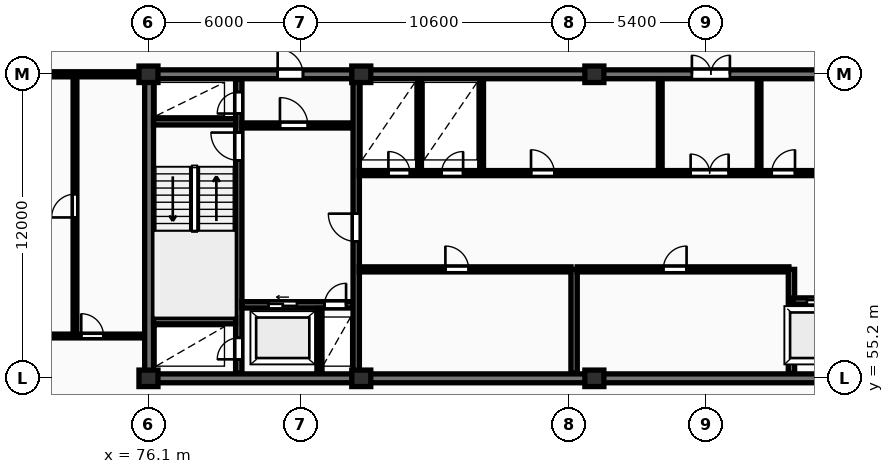
"""IFC4 building model, lengths in metres.
Left out: names, types, materials, properties, quantities, classifications, styles, units other than length and angle.
Written with IfcOpenShell. Run it as: python <this file> out.ifc"""

import sys

from ifc_helpers import new_model, si_unit, direction, frame, frame_2d, origin, origin_2d, place, context, subcontext, project, spatial, rectangle, extrude, element, fill, save


model = new_model("IFC4")
c1 = context("Model", 3, precision=1e-05, world=origin(), true_north=direction((0.0, 1.0)))
c2 = subcontext(c1, "Body", "Model", "MODEL_VIEW")
j1 = project(units=[si_unit("LENGTHUNIT", "METRE"), si_unit("PLANEANGLEUNIT", "RADIAN")], contexts=[c1])
p1 = place(None, origin())
s1 = spatial("IfcSite", under=j1, at=p1, CompositionType="ELEMENT")
p2 = place(p1, origin())
s2 = spatial("IfcBuilding", under=s1, at=p2, CompositionType="ELEMENT")
p3 = place(p2, frame((0.0, 0.0, 228.65)))
s3 = spatial("IfcBuildingStorey", under=s2, at=p3, CompositionType="ELEMENT", Elevation=228.65)
for number, where, z_axis, x_axis in (
    (1, (76.1, 55.2, 0.0), (0.0, 0.0, 1.0), (1.0, 0.0, 0.0)),
    (2, (76.1, 67.2, 0.0), (0.0, 0.0, 1.0), (1.0, 0.0, 0.0)),
    (3, (84.5, 55.2, 0.0), (0.0, 0.0, 1.0), (1.0, 0.0, 0.0)),
    (4, (84.5, 67.2, 0.0), (0.0, 0.0, 1.0), (1.0, 0.0, 0.0)),
    (5, (93.7, 55.2, 0.0), (0.0, 0.0, 1.0), (1.0, 0.0, 0.0)),
    (6, (93.7, 67.2, 0.0), (0.0, 0.0, 1.0), (1.0, 0.0, 0.0)),
):
    element("IfcColumn", number, at=place(p3, frame(where, z_axis=z_axis, x_axis=x_axis)), inside=s3, PredefinedType="COLUMN", context=c2, shape_type="SweptSolid", body=[
        extrude(rectangle(XDim=0.75, YDim=0.65, at=origin_2d()), origin(), (0.0, 0.0, 1.0), 3.45),
    ])
p4 = place(p3, frame((75.95, 55.2, 0.0), z_axis=(0.0, 0.0, 1.0), x_axis=(1.0, 0.0, 0.0)))
e7 = element("IfcWall", 7, at=p4, inside=s3, PredefinedType="SHEAR", context=c2, shape_type="SweptSolid", body=[
    extrude(rectangle(XDim=36.3, YDim=0.35, at=frame_2d((18.15, 0.0))), origin(), (0.0, 0.0, 1.0), 3.45),
])
p5 = place(p3, frame((76.125, 55.375, 0.0), z_axis=(0.0, 0.0, 1.0), x_axis=(0.0, 1.0, 0.0)))
e8 = element("IfcWall", 8, at=p5, inside=s3, PredefinedType="SHEAR", context=c2, shape_type="SweptSolid", body=[
    extrude(rectangle(XDim=11.65, YDim=0.35, at=frame_2d((5.825, 0.0))), origin(), (0.0, 0.0, 1.0), 3.45),
])
p6 = place(p3, frame((75.95, 67.2, 0.0), z_axis=(0.0, 0.0, 1.0), x_axis=(1.0, 0.0, 0.0)))
e9 = element("IfcWall", 9, at=p6, inside=s3, PredefinedType="SHEAR", context=c2, shape_type="SweptSolid", body=[
    extrude(rectangle(XDim=36.3, YDim=0.35, at=frame_2d((18.15, 0.0))), origin(), (0.0, 0.0, 1.0), 3.45),
])
p7 = place(p6, frame((5.25, 0.0, 0.0)))
e10 = element("IfcOpeningElement", 10, at=p7, cuts=e9, PredefinedType="OPENING", context=c2, shape_type="SweptSolid", body=[
    extrude(rectangle(XDim=1.0, YDim=2.15, at=frame_2d((0.5, 1.075))), frame((0.0, 0.185, 0.0), z_axis=(0.0, -1.0, 0.0), x_axis=(1.0, 0.0, 0.0)), (0.0, 0.0, 1.0), 0.37),
])
p8 = place(p6, frame((21.6, 0.0, 0.0)))
e11 = element("IfcOpeningElement", 11, at=p8, cuts=e9, PredefinedType="OPENING", context=c2, shape_type="SweptSolid", body=[
    extrude(rectangle(XDim=1.5, YDim=2.2, at=frame_2d((0.75, 1.1))), frame((0.0, 0.185, 0.0), z_axis=(0.0, -1.0, 0.0), x_axis=(1.0, 0.0, 0.0)), (0.0, 0.0, 1.0), 0.37),
])
p9 = place(p6, frame((30.45, 0.0, 0.0)))
e12 = element("IfcOpeningElement", 12, at=p9, cuts=e9, PredefinedType="OPENING", context=c2, shape_type="SweptSolid", body=[
    extrude(rectangle(XDim=1.0, YDim=2.15, at=frame_2d((0.5, 1.075))), frame((0.0, 0.185, 0.0), z_axis=(0.0, -1.0, 0.0), x_axis=(1.0, 0.0, 0.0)), (0.0, 0.0, 1.0), 0.37),
])
p10 = place(p3, frame((79.665, 55.4, 0.0), z_axis=(0.0, 0.0, 1.0), x_axis=(0.0, 1.0, 0.0)))
e13 = element("IfcWall", 13, at=p10, inside=s3, PredefinedType="SHEAR", context=c2, shape_type="SweptSolid", body=[
    extrude(rectangle(XDim=11.6, YDim=0.25, at=frame_2d((5.8, 0.0))), origin(), (0.0, 0.0, 1.0), 3.45),
])
p11 = place(p10, frame((0.55, 0.0, 0.0)))
e14 = element("IfcOpeningElement", 14, at=p11, cuts=e13, PredefinedType="OPENING", context=c2, shape_type="SweptSolid", body=[
    extrude(rectangle(XDim=0.85, YDim=2.05, at=frame_2d((0.425, 1.025))), frame((0.0, 0.135, 0.0), z_axis=(0.0, -1.0, 0.0), x_axis=(1.0, 0.0, 0.0)), (0.0, 0.0, 1.0), 0.27),
])
p12 = place(p10, frame((8.4, 0.0, 0.0)))
e15 = element("IfcOpeningElement", 15, at=p12, cuts=e13, PredefinedType="OPENING", context=c2, shape_type="SweptSolid", body=[
    extrude(rectangle(XDim=1.1, YDim=2.1, at=frame_2d((0.55, 1.05))), frame((0.0, 0.135, 0.0), z_axis=(0.0, -1.0, 0.0), x_axis=(1.0, 0.0, 0.0)), (0.0, 0.0, 1.0), 0.27),
])
p13 = place(p10, frame((10.25, 0.0, 0.0)))
e16 = element("IfcOpeningElement", 16, at=p13, cuts=e13, PredefinedType="OPENING", context=c2, shape_type="SweptSolid", body=[
    extrude(rectangle(XDim=0.85, YDim=2.05, at=frame_2d((0.425, 1.025))), frame((0.0, 0.135, 0.0), z_axis=(0.0, -1.0, 0.0), x_axis=(1.0, 0.0, 0.0)), (0.0, 0.0, 1.0), 0.27),
])
for number, where, z_axis, x_axis in (
    (17, (76.3, 57.475, 0.0), (0.0, 0.0, 1.0), (1.0, 0.0, 0.0)),
    (18, (76.3, 65.325, 0.0), (0.0, 0.0, 1.0), (1.0, 0.0, 0.0)),
):
    element("IfcWall", number, at=place(p3, frame(where, z_axis=z_axis, x_axis=x_axis)), inside=s3, PredefinedType="SHEAR", context=c2, shape_type="SweptSolid", body=[
        extrude(rectangle(XDim=3.24, YDim=0.25, at=frame_2d((1.62, 0.0))), origin(), (0.0, 0.0, 1.0), 3.45),
    ])
p14 = place(p3, frame((79.79, 58.1, 0.0), z_axis=(0.0, 0.0, 1.0), x_axis=(1.0, 0.0, 0.0)))
e19 = element("IfcWall", 19, at=p14, inside=s3, PredefinedType="SHEAR", context=c2, shape_type="SweptSolid", body=[
    extrude(rectangle(XDim=4.39, YDim=0.25, at=frame_2d((2.195, 0.0))), origin(), (0.0, 0.0, 1.0), 3.45),
])
p15 = place(p14, frame((1.05, 0.0, 0.0)))
e20 = element("IfcOpeningElement", 20, at=p15, cuts=e19, PredefinedType="OPENING", context=c2, shape_type="SweptSolid", body=[
    extrude(rectangle(XDim=1.12, YDim=2.12, at=frame_2d((0.56, 1.06))), frame((0.0, 0.135, 0.0), z_axis=(0.0, -1.0, 0.0), x_axis=(1.0, 0.0, 0.0)), (0.0, 0.0, 1.0), 0.27),
])
p16 = place(p14, frame((3.26, 0.0, 0.0)))
e21 = element("IfcOpeningElement", 21, at=p16, cuts=e19, PredefinedType="OPENING", context=c2, shape_type="SweptSolid", body=[
    extrude(rectangle(XDim=0.85, YDim=2.05, at=frame_2d((0.425, 1.025))), frame((0.0, 0.135, 0.0), z_axis=(0.0, -1.0, 0.0), x_axis=(1.0, 0.0, 0.0)), (0.0, 0.0, 1.0), 0.27),
])
p17 = place(p3, frame((82.85, 55.4, 0.0), z_axis=(0.0, 0.0, 1.0), x_axis=(0.0, 1.0, 0.0)))
e22 = element("IfcWall", 22, at=p17, inside=s3, PredefinedType="PARTITIONING", context=c2, shape_type="SweptSolid", body=[
    extrude(rectangle(XDim=2.56, YDim=0.2, at=frame_2d((1.28, 0.0))), origin(), (0.0, 0.0, 1.0), 3.17),
])
p18 = place(p3, frame((79.79, 65.18, 0.0), z_axis=(0.0, 0.0, 1.0), x_axis=(1.0, 0.0, 0.0)))
e23 = element("IfcWall", 23, at=p18, inside=s3, PredefinedType="PARTITIONING", context=c2, shape_type="SweptSolid", body=[
    extrude(rectangle(XDim=4.39, YDim=0.2, at=frame_2d((2.195, 0.0))), origin(), (0.0, 0.0, 1.0), 3.17),
])
p19 = place(p18, frame((1.5, 0.0, 0.0)))
e24 = element("IfcOpeningElement", 24, at=p19, cuts=e23, PredefinedType="OPENING", context=c2, shape_type="SweptSolid", body=[
    extrude(rectangle(XDim=1.1, YDim=2.1, at=frame_2d((0.55, 1.05))), frame((0.0, 0.11, 0.0), z_axis=(0.0, -1.0, 0.0), x_axis=(1.0, 0.0, 0.0)), (0.0, 0.0, 1.0), 0.22),
])
p20 = place(p3, frame((84.3, 55.4, 0.0), z_axis=(0.0, 0.0, 1.0), x_axis=(0.0, 1.0, 0.0)))
e25 = element("IfcWall", 25, at=p20, inside=s3, PredefinedType="SHEAR", context=c2, shape_type="SweptSolid", body=[
    extrude(rectangle(XDim=11.6, YDim=0.25, at=frame_2d((5.8, 0.0))), origin(), (0.0, 0.0, 1.0), 3.45),
])
p21 = place(p20, frame((5.2, 0.0, 0.0)))
e26 = element("IfcOpeningElement", 26, at=p21, cuts=e25, PredefinedType="OPENING", context=c2, shape_type="SweptSolid", body=[
    extrude(rectangle(XDim=1.1, YDim=2.1, at=frame_2d((0.55, 1.05))), frame((0.0, 0.135, 0.0), z_axis=(0.0, -1.0, 0.0), x_axis=(1.0, 0.0, 0.0)), (0.0, 0.0, 1.0), 0.27),
])
p22 = place(p3, frame((84.42, 59.5, 0.0), z_axis=(0.0, 0.0, 1.0), x_axis=(1.0, 0.0, 0.0)))
e27 = element("IfcWall", 27, at=p22, inside=s3, PredefinedType="PARTITIONING", context=c2, shape_type="SweptSolid", body=[
    extrude(rectangle(XDim=8.36, YDim=0.2, at=frame_2d((4.18, 0.0))), origin(), (0.0, 0.0, 1.0), 3.17),
])
p23 = place(p22, frame((3.4, 0.0, 0.0)))
e28 = element("IfcOpeningElement", 28, at=p23, cuts=e27, PredefinedType="OPENING", context=c2, shape_type="SweptSolid", body=[
    extrude(rectangle(XDim=0.92, YDim=2.08, at=frame_2d((0.46, 1.04))), frame((0.0, 0.11, 0.0), z_axis=(0.0, -1.0, 0.0), x_axis=(1.0, 0.0, 0.0)), (0.0, 0.0, 1.0), 0.22),
])
p24 = place(p3, frame((92.9, 55.4, 0.0), z_axis=(0.0, 0.0, 1.0), x_axis=(0.0, 1.0, 0.0)))
e29 = element("IfcWall", 29, at=p24, inside=s3, PredefinedType="SHEAR", context=c2, shape_type="SweptSolid", body=[
    extrude(rectangle(XDim=4.1, YDim=0.25, at=frame_2d((2.05, 0.0))), origin(), (0.0, 0.0, 1.0), 3.45),
])
p25 = place(p3, frame((93.02, 59.5, 0.0), z_axis=(0.0, 0.0, 1.0), x_axis=(1.0, 0.0, 0.0)))
e30 = element("IfcWall", 30, at=p25, inside=s3, PredefinedType="PARTITIONING", context=c2, shape_type="SweptSolid", body=[
    extrude(rectangle(XDim=8.36, YDim=0.2, at=frame_2d((4.18, 0.0))), origin(), (0.0, 0.0, 1.0), 3.17),
])
p26 = place(p25, frame((3.4, 0.0, 0.0)))
e31 = element("IfcOpeningElement", 31, at=p26, cuts=e30, PredefinedType="OPENING", context=c2, shape_type="SweptSolid", body=[
    extrude(rectangle(XDim=0.92, YDim=2.08, at=frame_2d((0.46, 1.04))), frame((0.0, 0.11, 0.0), z_axis=(0.0, -1.0, 0.0), x_axis=(1.0, 0.0, 0.0)), (0.0, 0.0, 1.0), 0.22),
])
p27 = place(p3, frame((101.48, 55.4, 0.0), z_axis=(0.0, 0.0, 1.0), x_axis=(0.0, 1.0, 0.0)))
e32 = element("IfcWall", 32, at=p27, inside=s3, PredefinedType="SHEAR", context=c2, shape_type="SweptSolid", body=[
    extrude(rectangle(XDim=4.1, YDim=0.25, at=frame_2d((2.05, 0.0))), origin(), (0.0, 0.0, 1.0), 3.45),
])
p28 = place(p3, frame((101.55, 58.25, 0.0), z_axis=(0.0, 0.0, 1.0), x_axis=(1.0, 0.0, 0.0)))
e33 = element("IfcWall", 33, at=p28, inside=s3, PredefinedType="SHEAR", context=c2, shape_type="SweptSolid", body=[
    extrude(rectangle(XDim=4.6, YDim=0.25, at=frame_2d((2.3, 0.0))), origin(), (0.0, 0.0, 1.0), 3.45),
])
p29 = place(p28, frame((0.54, 0.0, 0.0)))
e34 = element("IfcOpeningElement", 34, at=p29, cuts=e33, PredefinedType="OPENING", context=c2, shape_type="SweptSolid", body=[
    extrude(rectangle(XDim=1.12, YDim=2.12, at=frame_2d((0.56, 1.06))), frame((0.0, 0.135, 0.0), z_axis=(0.0, -1.0, 0.0), x_axis=(1.0, 0.0, 0.0)), (0.0, 0.0, 1.0), 0.27),
])
p30 = place(p28, frame((2.94, 0.0, 0.0)))
e35 = element("IfcOpeningElement", 35, at=p30, cuts=e33, PredefinedType="OPENING", context=c2, shape_type="SweptSolid", body=[
    extrude(rectangle(XDim=1.12, YDim=2.12, at=frame_2d((0.56, 1.06))), frame((0.0, 0.135, 0.0), z_axis=(0.0, -1.0, 0.0), x_axis=(1.0, 0.0, 0.0)), (0.0, 0.0, 1.0), 0.27),
])
for number, where, z_axis, x_axis in (
    (36, (86.8, 63.4, 0.0), (0.0, 0.0, 1.0), (0.0, 1.0, 0.0)),
    (37, (89.25, 63.4, 0.0), (0.0, 0.0, 1.0), (0.0, 1.0, 0.0)),
    (38, (96.3, 63.4, 0.0), (0.0, 0.0, 1.0), (0.0, 1.0, 0.0)),
    (39, (100.2, 63.4, 0.0), (0.0, 0.0, 1.0), (0.0, 1.0, 0.0)),
):
    element("IfcWall", number, at=place(p3, frame(where, z_axis=z_axis, x_axis=x_axis)), inside=s3, PredefinedType="PARTITIONING", context=c2, shape_type="SweptSolid", body=[
        extrude(rectangle(XDim=3.6, YDim=0.15, at=frame_2d((1.8, 0.0))), origin(), (0.0, 0.0, 1.0), 3.17),
    ])
p31 = place(p3, frame((84.42, 63.3, 0.0), z_axis=(0.0, 0.0, 1.0), x_axis=(1.0, 0.0, 0.0)))
e40 = element("IfcWall", 40, at=p31, inside=s3, PredefinedType="PARTITIONING", context=c2, shape_type="SweptSolid", body=[
    extrude(rectangle(XDim=19.83, YDim=0.2, at=frame_2d((9.915, 0.0))), origin(), (0.0, 0.0, 1.0), 3.17),
])
p32 = place(p31, frame((1.15, 0.0, 0.0)))
e41 = element("IfcOpeningElement", 41, at=p32, cuts=e40, PredefinedType="OPENING", context=c2, shape_type="SweptSolid", body=[
    extrude(rectangle(XDim=0.85, YDim=2.05, at=frame_2d((0.425, 1.025))), frame((0.0, 0.11, 0.0), z_axis=(0.0, -1.0, 0.0), x_axis=(1.0, 0.0, 0.0)), (0.0, 0.0, 1.0), 0.22),
])
p33 = place(p31, frame((3.25, 0.0, 0.0)))
e42 = element("IfcOpeningElement", 42, at=p33, cuts=e40, PredefinedType="OPENING", context=c2, shape_type="SweptSolid", body=[
    extrude(rectangle(XDim=0.85, YDim=2.05, at=frame_2d((0.425, 1.025))), frame((0.0, 0.11, 0.0), z_axis=(0.0, -1.0, 0.0), x_axis=(1.0, 0.0, 0.0)), (0.0, 0.0, 1.0), 0.22),
])
p34 = place(p31, frame((13.08, 0.0, 0.0)))
e43 = element("IfcOpeningElement", 43, at=p34, cuts=e40, PredefinedType="OPENING", context=c2, shape_type="SweptSolid", body=[
    extrude(rectangle(XDim=1.5, YDim=2.2, at=frame_2d((0.75, 1.1))), frame((0.0, 0.11, 0.0), z_axis=(0.0, -1.0, 0.0), x_axis=(1.0, 0.0, 0.0)), (0.0, 0.0, 1.0), 0.22),
])
p35 = place(p31, frame((6.78, 0.0, 0.0)))
e44 = element("IfcOpeningElement", 44, at=p35, cuts=e40, PredefinedType="OPENING", context=c2, shape_type="SweptSolid", body=[
    extrude(rectangle(XDim=0.92, YDim=2.08, at=frame_2d((0.46, 1.04))), frame((0.0, 0.11, 0.0), z_axis=(0.0, -1.0, 0.0), x_axis=(1.0, 0.0, 0.0)), (0.0, 0.0, 1.0), 0.22),
])
p36 = place(p31, frame((16.28, 0.0, 0.0)))
e45 = element("IfcOpeningElement", 45, at=p36, cuts=e40, PredefinedType="OPENING", context=c2, shape_type="SweptSolid", body=[
    extrude(rectangle(XDim=0.92, YDim=2.08, at=frame_2d((0.46, 1.04))), frame((0.0, 0.11, 0.0), z_axis=(0.0, -1.0, 0.0), x_axis=(1.0, 0.0, 0.0)), (0.0, 0.0, 1.0), 0.22),
])
p37 = place(p3, frame((73.2, 56.87, 0.0), z_axis=(0.0, 0.0, 1.0), x_axis=(0.0, 1.0, 0.0)))
e46 = element("IfcWall", 46, at=p37, inside=s3, PredefinedType="PARTITIONING", context=c2, shape_type="SweptSolid", body=[
    extrude(rectangle(XDim=10.28, YDim=0.15, at=frame_2d((5.14, 0.0))), origin(), (0.0, 0.0, 1.0), 3.17),
])
p38 = place(p37, frame((4.68, 0.0, 0.0)))
e47 = element("IfcOpeningElement", 47, at=p38, cuts=e46, PredefinedType="OPENING", context=c2, shape_type="SweptSolid", body=[
    extrude(rectangle(XDim=0.92, YDim=2.08, at=frame_2d((0.46, 1.04))), frame((0.0, 0.085, 0.0), z_axis=(0.0, -1.0, 0.0), x_axis=(1.0, 0.0, 0.0)), (0.0, 0.0, 1.0), 0.17),
])
p39 = place(p3, frame((69.17, 56.87, 0.0), z_axis=(0.0, 0.0, 1.0), x_axis=(1.0, 0.0, 0.0)))
e48 = element("IfcWall", 48, at=p39, inside=s3, PredefinedType="PARTITIONING", context=c2, shape_type="SweptSolid", body=[
    extrude(rectangle(XDim=6.76, YDim=0.15, at=frame_2d((3.38, 0.0))), origin(), (0.0, 0.0, 1.0), 3.17),
])
p40 = place(p39, frame((1.362, 0.0, 0.0)))
e49 = element("IfcOpeningElement", 49, at=p40, cuts=e48, PredefinedType="OPENING", context=c2, shape_type="SweptSolid", body=[
    extrude(rectangle(XDim=0.84, YDim=2.04, at=frame_2d((0.42, 1.02))), frame((0.0, 0.085, 0.0), z_axis=(0.0, -1.0, 0.0), x_axis=(1.0, 0.0, 0.0)), (0.0, 0.0, 1.0), 0.17),
])
p41 = place(p39, frame((4.277, 0.0, 0.0)))
e50 = element("IfcOpeningElement", 50, at=p41, cuts=e48, PredefinedType="OPENING", context=c2, shape_type="SweptSolid", body=[
    extrude(rectangle(XDim=0.88, YDim=2.06, at=frame_2d((0.44, 1.03))), frame((0.0, 0.085, 0.0), z_axis=(0.0, -1.0, 0.0), x_axis=(1.0, 0.0, 0.0)), (0.0, 0.0, 1.0), 0.17),
])
p42 = place(p3, frame((59.8, 67.2, 0.0), z_axis=(0.0, 0.0, 1.0), x_axis=(1.0, 0.0, 0.0)))
e51 = element("IfcWall", 51, at=p42, inside=s3, PredefinedType="PARTITIONING", context=c2, shape_type="SweptSolid", body=[
    extrude(rectangle(XDim=16.15, YDim=0.2, at=frame_2d((8.075, 0.0))), origin(), (0.0, 0.0, 1.0), 2.633),
])
p43 = place(p42, frame((9.772, 0.0, 0.0)))
e52 = element("IfcOpeningElement", 52, at=p43, cuts=e51, PredefinedType="OPENING", context=c2, shape_type="SweptSolid", body=[
    extrude(rectangle(XDim=0.95, YDim=2.15, at=frame_2d((0.475, 1.075))), frame((0.0, 0.11, 0.0), z_axis=(0.0, -1.0, 0.0), x_axis=(1.0, 0.0, 0.0)), (0.0, 0.0, 1.0), 0.22),
])
p44 = place(p7, origin())
e53 = element("IfcDoor", 53, at=p44, inside=s3, OperationType="SINGLE_SWING_LEFT", PredefinedType="DOOR", context=c2, shape_type="SweptSolid", body=[
    extrude(rectangle(XDim=1.0, YDim=2.15, at=frame_2d((0.5, 1.075))), frame((0.0, 0.025, 0.0), z_axis=(0.0, -1.0, 0.0), x_axis=(1.0, 0.0, 0.0)), (0.0, 0.0, 1.0), 0.05),
])
fill(e10, e53)
p45 = place(p8, origin())
e54 = element("IfcDoor", 54, at=p45, inside=s3, OperationType="DOUBLE_DOOR_SINGLE_SWING", PredefinedType="DOOR", context=c2, shape_type="SweptSolid", body=[
    extrude(rectangle(XDim=1.5, YDim=2.2, at=frame_2d((0.75, 1.1))), frame((0.0, 0.025, 0.0), z_axis=(0.0, -1.0, 0.0), x_axis=(1.0, 0.0, 0.0)), (0.0, 0.0, 1.0), 0.05),
])
fill(e11, e54)
p46 = place(p11, origin())
e55 = element("IfcDoor", 55, at=p46, inside=s3, OperationType="SINGLE_SWING_LEFT", PredefinedType="DOOR", context=c2, shape_type="SweptSolid", body=[
    extrude(rectangle(XDim=0.85, YDim=2.05, at=frame_2d((0.425, 1.025))), frame((0.0, 0.025, 0.0), z_axis=(0.0, -1.0, 0.0), x_axis=(1.0, 0.0, 0.0)), (0.0, 0.0, 1.0), 0.05),
])
fill(e14, e55)
p47 = place(p12, origin())
e56 = element("IfcDoor", 56, at=p47, inside=s3, OperationType="SINGLE_SWING_RIGHT", PredefinedType="DOOR", context=c2, shape_type="SweptSolid", body=[
    extrude(rectangle(XDim=1.1, YDim=2.1, at=frame_2d((0.55, 1.05))), frame((0.0, 0.025, 0.0), z_axis=(0.0, -1.0, 0.0), x_axis=(1.0, 0.0, 0.0)), (0.0, 0.0, 1.0), 0.05),
])
fill(e15, e56)
p48 = place(p13, origin())
e57 = element("IfcDoor", 57, at=p48, inside=s3, OperationType="SINGLE_SWING_LEFT", PredefinedType="DOOR", context=c2, shape_type="SweptSolid", body=[
    extrude(rectangle(XDim=0.85, YDim=2.05, at=frame_2d((0.425, 1.025))), frame((0.0, 0.025, 0.0), z_axis=(0.0, -1.0, 0.0), x_axis=(1.0, 0.0, 0.0)), (0.0, 0.0, 1.0), 0.05),
])
fill(e16, e57)
p49 = place(p15, origin())
e58 = element("IfcDoor", 58, at=p49, inside=s3, OperationType="SLIDING_TO_LEFT", PredefinedType="DOOR", context=c2, shape_type="SweptSolid", body=[
    extrude(rectangle(XDim=1.12, YDim=2.12, at=frame_2d((0.56, 1.06))), frame((0.0, 0.025, 0.0), z_axis=(0.0, -1.0, 0.0), x_axis=(1.0, 0.0, 0.0)), (0.0, 0.0, 1.0), 0.05),
])
fill(e20, e58)
p50 = place(p16, origin())
e59 = element("IfcDoor", 59, at=p50, inside=s3, OperationType="SINGLE_SWING_RIGHT", PredefinedType="DOOR", context=c2, shape_type="SweptSolid", body=[
    extrude(rectangle(XDim=0.85, YDim=2.05, at=frame_2d((0.425, 1.025))), frame((0.0, 0.025, 0.0), z_axis=(0.0, -1.0, 0.0), x_axis=(1.0, 0.0, 0.0)), (0.0, 0.0, 1.0), 0.05),
])
fill(e21, e59)
p51 = place(p19, origin())
e60 = element("IfcDoor", 60, at=p51, inside=s3, OperationType="SINGLE_SWING_LEFT", PredefinedType="DOOR", context=c2, shape_type="SweptSolid", body=[
    extrude(rectangle(XDim=1.1, YDim=2.1, at=frame_2d((0.55, 1.05))), frame((0.0, 0.025, 0.0), z_axis=(0.0, -1.0, 0.0), x_axis=(1.0, 0.0, 0.0)), (0.0, 0.0, 1.0), 0.05),
])
fill(e24, e60)
p52 = place(p21, origin())
e61 = element("IfcDoor", 61, at=p52, inside=s3, OperationType="SINGLE_SWING_RIGHT", PredefinedType="DOOR", context=c2, shape_type="SweptSolid", body=[
    extrude(rectangle(XDim=1.1, YDim=2.1, at=frame_2d((0.55, 1.05))), frame((0.0, 0.025, 0.0), z_axis=(0.0, -1.0, 0.0), x_axis=(1.0, 0.0, 0.0)), (0.0, 0.0, 1.0), 0.05),
])
fill(e26, e61)
p53 = place(p23, origin())
e62 = element("IfcDoor", 62, at=p53, inside=s3, OperationType="SINGLE_SWING_LEFT", PredefinedType="DOOR", context=c2, shape_type="SweptSolid", body=[
    extrude(rectangle(XDim=0.92, YDim=2.08, at=frame_2d((0.46, 1.04))), frame((0.0, 0.025, 0.0), z_axis=(0.0, -1.0, 0.0), x_axis=(1.0, 0.0, 0.0)), (0.0, 0.0, 1.0), 0.05),
])
fill(e28, e62)
p54 = place(p26, origin())
e63 = element("IfcDoor", 63, at=p54, inside=s3, OperationType="SINGLE_SWING_RIGHT", PredefinedType="DOOR", context=c2, shape_type="SweptSolid", body=[
    extrude(rectangle(XDim=0.92, YDim=2.08, at=frame_2d((0.46, 1.04))), frame((0.0, 0.025, 0.0), z_axis=(0.0, -1.0, 0.0), x_axis=(1.0, 0.0, 0.0)), (0.0, 0.0, 1.0), 0.05),
])
fill(e31, e63)
p55 = place(p29, origin())
e64 = element("IfcDoor", 64, at=p55, inside=s3, OperationType="SLIDING_TO_LEFT", PredefinedType="DOOR", context=c2, shape_type="SweptSolid", body=[
    extrude(rectangle(XDim=1.12, YDim=2.12, at=frame_2d((0.56, 1.06))), frame((0.0, 0.025, 0.0), z_axis=(0.0, -1.0, 0.0), x_axis=(1.0, 0.0, 0.0)), (0.0, 0.0, 1.0), 0.05),
])
fill(e34, e64)
p56 = place(p32, origin())
e65 = element("IfcDoor", 65, at=p56, inside=s3, OperationType="SINGLE_SWING_LEFT", PredefinedType="DOOR", context=c2, shape_type="SweptSolid", body=[
    extrude(rectangle(XDim=0.85, YDim=2.05, at=frame_2d((0.425, 1.025))), frame((0.0, 0.025, 0.0), z_axis=(0.0, -1.0, 0.0), x_axis=(1.0, 0.0, 0.0)), (0.0, 0.0, 1.0), 0.05),
])
fill(e41, e65)
p57 = place(p33, origin())
e66 = element("IfcDoor", 66, at=p57, inside=s3, OperationType="SINGLE_SWING_RIGHT", PredefinedType="DOOR", context=c2, shape_type="SweptSolid", body=[
    extrude(rectangle(XDim=0.85, YDim=2.05, at=frame_2d((0.425, 1.025))), frame((0.0, 0.025, 0.0), z_axis=(0.0, -1.0, 0.0), x_axis=(1.0, 0.0, 0.0)), (0.0, 0.0, 1.0), 0.05),
])
fill(e42, e66)
p58 = place(p34, origin())
e67 = element("IfcDoor", 67, at=p58, inside=s3, OperationType="DOUBLE_DOOR_SINGLE_SWING", PredefinedType="DOOR", context=c2, shape_type="SweptSolid", body=[
    extrude(rectangle(XDim=1.5, YDim=2.2, at=frame_2d((0.75, 1.1))), frame((0.0, 0.025, 0.0), z_axis=(0.0, -1.0, 0.0), x_axis=(1.0, 0.0, 0.0)), (0.0, 0.0, 1.0), 0.05),
])
fill(e43, e67)
p59 = place(p35, origin())
e68 = element("IfcDoor", 68, at=p59, inside=s3, OperationType="SINGLE_SWING_LEFT", PredefinedType="DOOR", context=c2, shape_type="SweptSolid", body=[
    extrude(rectangle(XDim=0.92, YDim=2.08, at=frame_2d((0.46, 1.04))), frame((0.0, 0.025, 0.0), z_axis=(0.0, -1.0, 0.0), x_axis=(1.0, 0.0, 0.0)), (0.0, 0.0, 1.0), 0.05),
])
fill(e44, e68)
p60 = place(p36, origin())
e69 = element("IfcDoor", 69, at=p60, inside=s3, OperationType="SINGLE_SWING_RIGHT", PredefinedType="DOOR", context=c2, shape_type="SweptSolid", body=[
    extrude(rectangle(XDim=0.92, YDim=2.08, at=frame_2d((0.46, 1.04))), frame((0.0, 0.025, 0.0), z_axis=(0.0, -1.0, 0.0), x_axis=(1.0, 0.0, 0.0)), (0.0, 0.0, 1.0), 0.05),
])
fill(e45, e69)
p61 = place(p38, origin())
e70 = element("IfcDoor", 70, at=p61, inside=s3, OperationType="SINGLE_SWING_LEFT", PredefinedType="DOOR", context=c2, shape_type="SweptSolid", body=[
    extrude(rectangle(XDim=0.92, YDim=2.08, at=frame_2d((0.46, 1.04))), frame((0.0, 0.025, 0.0), z_axis=(0.0, -1.0, 0.0), x_axis=(1.0, 0.0, 0.0)), (0.0, 0.0, 1.0), 0.05),
])
fill(e47, e70)
p62 = place(p41, origin())
e71 = element("IfcDoor", 71, at=p62, inside=s3, OperationType="SINGLE_SWING_LEFT", PredefinedType="DOOR", context=c2, shape_type="SweptSolid", body=[
    extrude(rectangle(XDim=0.88, YDim=2.06, at=frame_2d((0.44, 1.03))), frame((0.0, 0.025, 0.0), z_axis=(0.0, -1.0, 0.0), x_axis=(1.0, 0.0, 0.0)), (0.0, 0.0, 1.0), 0.05),
])
fill(e50, e71)
save(model, sys.argv[1])
